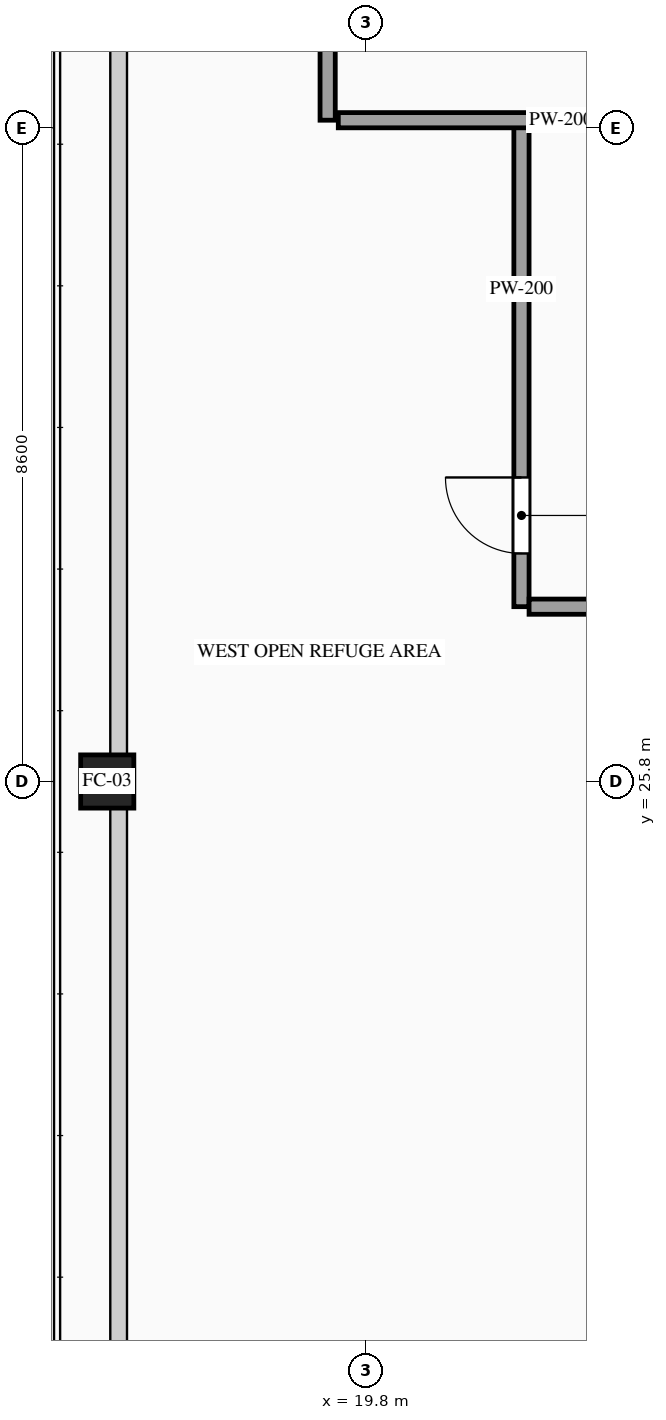
"""IFC4 building model, lengths in metres.
Left out: names, types, materials, properties, quantities, classifications, styles, units other than length and angle.
Written with IfcOpenShell. Run it as: python <this file> out.ifc"""

import sys

from ifc_helpers import new_model, si_unit, direction, frame, frame_2d, origin, origin_2d, place, context, subcontext, project, spatial, rectangle, hollow_rectangle, extrude, source, transform, mapped, element, fill, save


model = new_model("IFC4")
c1 = context("Model", 3, precision=1e-05, world=origin(), true_north=direction((0.0, 1.0)))
c2 = subcontext(c1, "Body", "Model", "MODEL_VIEW")
j1 = project(units=[si_unit("LENGTHUNIT", "METRE"), si_unit("PLANEANGLEUNIT", "RADIAN")], contexts=[c1])
p1 = place(None, origin())
s1 = spatial("IfcSite", under=j1, at=p1, CompositionType="ELEMENT")
p2 = place(p1, origin())
s2 = spatial("IfcBuilding", under=s1, at=p2, CompositionType="ELEMENT")
p3 = place(p2, frame((0.0, 0.0, 219.5)))
s3 = spatial("IfcBuildingStorey", under=s2, at=p3, CompositionType="ELEMENT", Elevation=219.5)
m1 = source(origin(), c2, "Body", "SweptSolid", [
    extrude(hollow_rectangle(XDim=0.7, YDim=0.7, WallThickness=0.032, at=origin_2d()), origin(), (0.0, 0.0, 1.0), 4.6),
])
p4 = place(p3, frame((16.4, 25.8, 0.0), z_axis=(0.0, 0.0, 1.0), x_axis=(1.0, 0.0, 0.0)))
e1 = element("IfcColumn", 1, at=p4, inside=s3, PredefinedType="COLUMN", context=c2, shape_type="MappedRepresentation", body=[
    mapped(m1, transform((0.0, 0.0, 0.0), scale=1.0)),
])
m2 = source(origin(), c2, "Body", "SweptSolid", [
    extrude(rectangle(XDim=11.6, YDim=0.2, at=frame_2d((5.8, 0.0))), origin(), (0.0, 0.0, 1.0), 4.38),
])
p5 = place(p3, frame((19.3, 34.5, 0.0), z_axis=(0.0, 0.0, 1.0), x_axis=(0.0, 1.0, 0.0)))
e2 = element("IfcWall", 2, at=p5, inside=s3, PredefinedType="PARTITIONING", context=c2, shape_type="MappedRepresentation", body=[
    mapped(m2, transform((0.0, 0.0, 0.0), scale=1.0)),
])
p6 = place(p3, frame((21.85, 28.1, 0.0), z_axis=(0.0, 0.0, 1.0), x_axis=(0.0, 1.0, 0.0)))
e3 = element("IfcWall", 3, at=p6, inside=s3, PredefinedType="PARTITIONING", context=c2, shape_type="SweptSolid", body=[
    extrude(rectangle(XDim=6.4, YDim=0.2, at=frame_2d((3.2, 0.0))), origin(), (0.0, 0.0, 1.0), 4.38),
])
p7 = place(p6, frame((0.7, 0.0, 0.0)))
e4 = element("IfcOpeningElement", 4, at=p7, cuts=e3, PredefinedType="OPENING", context=c2, shape_type="SweptSolid", body=[
    extrude(rectangle(XDim=1.0, YDim=2.2, at=frame_2d((0.5, 1.1))), frame((0.0, 0.115, 0.0), z_axis=(0.0, -1.0, 0.0), x_axis=(1.0, 0.0, 0.0)), (0.0, 0.0, 1.0), 0.23),
])
m3 = source(origin(), c2, "Body", "SweptSolid", [
    extrude(rectangle(XDim=1.555, YDim=0.2, at=frame_2d((0.777, 0.0))), origin(), (0.0, 0.0, 1.0), 4.38),
])
p8 = place(p3, frame((21.95, 28.1, 0.0), z_axis=(0.0, 0.0, 1.0), x_axis=(1.0, 0.0, 0.0)))
e5 = element("IfcWall", 5, at=p8, inside=s3, PredefinedType="PARTITIONING", context=c2, shape_type="MappedRepresentation", body=[
    mapped(m3, transform((0.0, 0.0, 0.0), scale=1.0)),
])
p9 = place(p3, frame((19.44, 34.5, 0.0), z_axis=(0.0, 0.0, 1.0), x_axis=(1.0, 0.0, 0.0)))
e6 = element("IfcWall", 6, at=p9, inside=s3, PredefinedType="PARTITIONING", context=c2, shape_type="SweptSolid", body=[
    extrude(rectangle(XDim=9.131, YDim=0.2, at=frame_2d((4.565, 0.0))), origin(), (0.0, 0.0, 1.0), 4.38),
])
p10 = place(p9, frame((6.11, 0.0, 0.0)))
e7 = element("IfcOpeningElement", 7, at=p10, cuts=e6, PredefinedType="OPENING", context=c2, shape_type="SweptSolid", body=[
    extrude(rectangle(XDim=1.5, YDim=2.3, at=frame_2d((0.75, 1.15))), frame((0.0, 0.115, 0.0), z_axis=(0.0, -1.0, 0.0), x_axis=(1.0, 0.0, 0.0)), (0.0, 0.0, 1.0), 0.23),
])
m4 = source(origin(), c2, "Body", "SweptSolid", [
    extrude(rectangle(XDim=1.0, YDim=2.2, at=frame_2d((0.5, 1.1))), frame((0.0, 0.025, 0.0), z_axis=(0.0, -1.0, 0.0), x_axis=(1.0, 0.0, 0.0)), (0.0, 0.0, 1.0), 0.05),
])
p11 = place(p7, origin())
e8 = element("IfcDoor", 8, at=p11, inside=s3, OperationType="SINGLE_SWING_RIGHT", PredefinedType="DOOR", context=c2, shape_type="MappedRepresentation", body=[
    mapped(m4, transform((0.0, 0.0, 0.0), scale=1.0)),
])
fill(e4, e8)
save(model, sys.argv[1])
